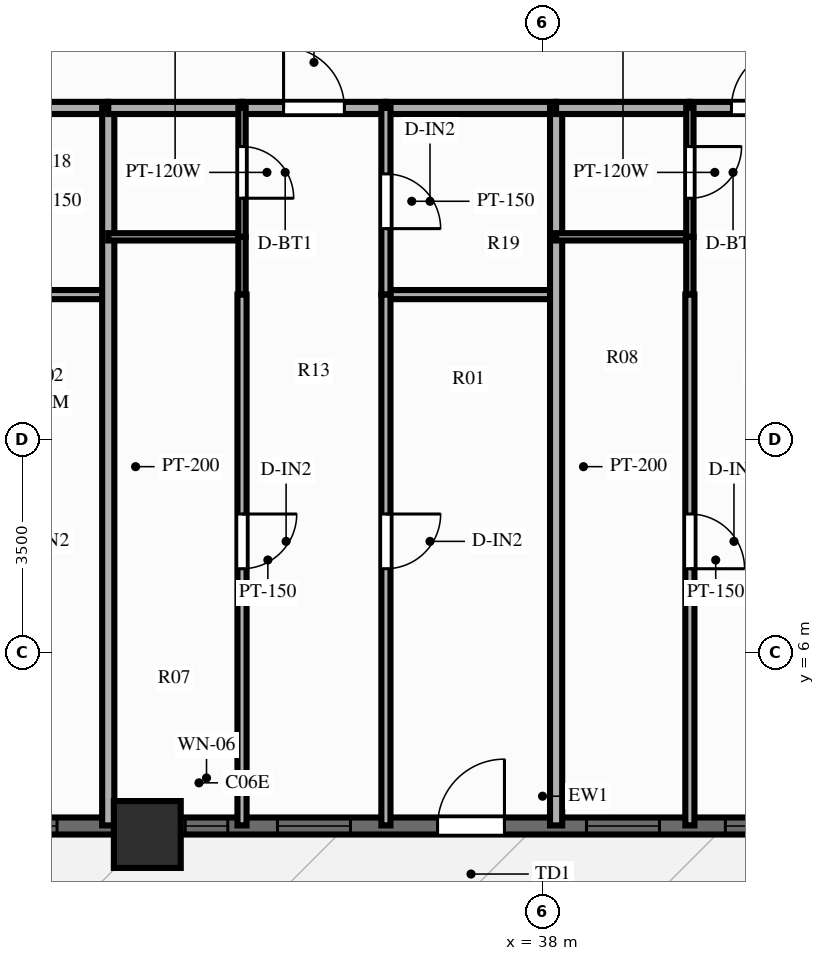
"""IFC4 building model, lengths in metres.
Left out: names, types, materials, properties, quantities, classifications, styles, units other than length and angle.
Written with IfcOpenShell. Run it as: python <this file> out.ifc"""

import sys

from ifc_helpers import new_model, si_unit, direction, frame, frame_2d, origin, origin_2d, place, context, subcontext, project, spatial, rectangle, extrude, source, transform, mapped, element, fill, save


model = new_model("IFC4")
c1 = context("Model", 3, precision=1e-05, world=origin(), true_north=direction((0.0, 1.0)))
c2 = subcontext(c1, "Body", "Model", "MODEL_VIEW")
j1 = project(units=[si_unit("LENGTHUNIT", "METRE"), si_unit("PLANEANGLEUNIT", "RADIAN")], contexts=[c1])
p1 = place(None, origin())
s1 = spatial("IfcSite", under=j1, at=p1, CompositionType="ELEMENT")
p2 = place(p1, origin())
s2 = spatial("IfcBuilding", under=s1, at=p2, CompositionType="ELEMENT")
p3 = place(p2, frame((0.0, 0.0, 19.4)))
s3 = spatial("IfcBuildingStorey", under=s2, at=p3, CompositionType="ELEMENT", Elevation=19.4)
m1 = source(origin(), c2, "Body", "SweptSolid", [
    extrude(rectangle(XDim=1.1, YDim=1.1, at=origin_2d()), origin(), (0.0, 0.0, 1.0), 3.0),
])
p4 = place(p3, frame((31.5, 3.0, 0.0), z_axis=(0.0, 0.0, 1.0), x_axis=(1.0, 0.0, 0.0)))
e1 = element("IfcColumn", 1, at=p4, inside=s3, PredefinedType="COLUMN", context=c2, shape_type="MappedRepresentation", body=[
    mapped(m1, transform((0.0, 0.0, 0.0), scale=1.0)),
])
p5 = place(p3, frame((15.5, 3.14, 0.0), z_axis=(0.0, 0.0, 1.0), x_axis=(1.0, 0.0, 0.0)))
e2 = element("IfcWall", 2, at=p5, inside=s3, PredefinedType="SOLIDWALL", context=c2, shape_type="SweptSolid", body=[
    extrude(rectangle(XDim=45.0, YDim=0.28, at=frame_2d((22.5, 0.0))), origin(), (0.0, 0.0, 1.0), 2.28),
])
p6 = place(p5, frame((0.785, 0.0, 0.25)))
e3 = element("IfcOpeningElement", 3, at=p6, cuts=e2, PredefinedType="OPENING", context=c2, shape_type="SweptSolid", body=[
    extrude(rectangle(XDim=1.2, YDim=1.5, at=frame_2d((0.6, 0.75))), frame((0.0, 0.152, 0.0), z_axis=(0.0, -1.0, 0.0), x_axis=(1.0, 0.0, 0.0)), (0.0, 0.0, 1.0), 0.304),
])
p7 = place(p5, frame((3.033, 0.0, 0.25)))
e4 = element("IfcOpeningElement", 4, at=p7, cuts=e2, PredefinedType="OPENING", context=c2, shape_type="SweptSolid", body=[
    extrude(rectangle(XDim=1.2, YDim=1.5, at=frame_2d((0.6, 0.75))), frame((0.0, 0.152, 0.0), z_axis=(0.0, -1.0, 0.0), x_axis=(1.0, 0.0, 0.0)), (0.0, 0.0, 1.0), 0.304),
])
p8 = place(p5, frame((5.727, 0.0, 0.25)))
e5 = element("IfcOpeningElement", 5, at=p8, cuts=e2, PredefinedType="OPENING", context=c2, shape_type="SweptSolid", body=[
    extrude(rectangle(XDim=1.2, YDim=1.5, at=frame_2d((0.6, 0.75))), frame((0.0, 0.152, 0.0), z_axis=(0.0, -1.0, 0.0), x_axis=(1.0, 0.0, 0.0)), (0.0, 0.0, 1.0), 0.304),
])
p9 = place(p5, frame((8.269, 0.0, 0.25)))
e6 = element("IfcOpeningElement", 6, at=p9, cuts=e2, PredefinedType="OPENING", context=c2, shape_type="SweptSolid", body=[
    extrude(rectangle(XDim=1.2, YDim=1.5, at=frame_2d((0.6, 0.75))), frame((0.0, 0.152, 0.0), z_axis=(0.0, -1.0, 0.0), x_axis=(1.0, 0.0, 0.0)), (0.0, 0.0, 1.0), 0.304),
])
p10 = place(p5, frame((10.621, 0.0, 0.25)))
e7 = element("IfcOpeningElement", 7, at=p10, cuts=e2, PredefinedType="OPENING", context=c2, shape_type="SweptSolid", body=[
    extrude(rectangle(XDim=1.2, YDim=1.5, at=frame_2d((0.6, 0.75))), frame((0.0, 0.152, 0.0), z_axis=(0.0, -1.0, 0.0), x_axis=(1.0, 0.0, 0.0)), (0.0, 0.0, 1.0), 0.304),
])
p11 = place(p5, frame((13.316, 0.0, 0.25)))
e8 = element("IfcOpeningElement", 8, at=p11, cuts=e2, PredefinedType="OPENING", context=c2, shape_type="SweptSolid", body=[
    extrude(rectangle(XDim=1.2, YDim=1.5, at=frame_2d((0.6, 0.75))), frame((0.0, 0.152, 0.0), z_axis=(0.0, -1.0, 0.0), x_axis=(1.0, 0.0, 0.0)), (0.0, 0.0, 1.0), 0.304),
])
p12 = place(p5, frame((16.624, 0.0, 0.25)))
e9 = element("IfcOpeningElement", 9, at=p12, cuts=e2, PredefinedType="OPENING", context=c2, shape_type="SweptSolid", body=[
    extrude(rectangle(XDim=0.7, YDim=1.5, at=frame_2d((0.35, 0.75))), frame((0.0, 0.152, 0.0), z_axis=(0.0, -1.0, 0.0), x_axis=(1.0, 0.0, 0.0)), (0.0, 0.0, 1.0), 0.304),
])
p13 = place(p5, frame((18.141, 0.0, 0.25)))
e10 = element("IfcOpeningElement", 10, at=p13, cuts=e2, PredefinedType="OPENING", context=c2, shape_type="SweptSolid", body=[
    extrude(rectangle(XDim=1.2, YDim=1.5, at=frame_2d((0.6, 0.75))), frame((0.0, 0.152, 0.0), z_axis=(0.0, -1.0, 0.0), x_axis=(1.0, 0.0, 0.0)), (0.0, 0.0, 1.0), 0.304),
])
p14 = place(p5, frame((21.874, 0.0, 0.0), z_axis=(0.0, 0.0, 1.0), x_axis=(-1.0, 0.0, 0.0)))
e11 = element("IfcOpeningElement", 11, at=p14, cuts=e2, PredefinedType="OPENING", context=c2, shape_type="SweptSolid", body=[
    extrude(rectangle(XDim=1.1, YDim=2.15, at=frame_2d((0.55, 1.075))), frame((0.0, 0.152, 0.0), z_axis=(0.0, -1.0, 0.0), x_axis=(1.0, 0.0, 0.0)), (0.0, 0.0, 1.0), 0.304),
])
p15 = place(p5, frame((23.223, 0.0, 0.25)))
e12 = element("IfcOpeningElement", 12, at=p15, cuts=e2, PredefinedType="OPENING", context=c2, shape_type="SweptSolid", body=[
    extrude(rectangle(XDim=1.2, YDim=1.5, at=frame_2d((0.6, 0.75))), frame((0.0, 0.152, 0.0), z_axis=(0.0, -1.0, 0.0), x_axis=(1.0, 0.0, 0.0)), (0.0, 0.0, 1.0), 0.304),
])
p16 = place(p5, frame((25.507, 0.0, 0.25)))
e13 = element("IfcOpeningElement", 13, at=p16, cuts=e2, PredefinedType="OPENING", context=c2, shape_type="SweptSolid", body=[
    extrude(rectangle(XDim=1.2, YDim=1.5, at=frame_2d((0.6, 0.75))), frame((0.0, 0.152, 0.0), z_axis=(0.0, -1.0, 0.0), x_axis=(1.0, 0.0, 0.0)), (0.0, 0.0, 1.0), 0.304),
])
p17 = place(p5, frame((27.6, 0.0, 0.25)))
e14 = element("IfcOpeningElement", 14, at=p17, cuts=e2, PredefinedType="OPENING", context=c2, shape_type="SweptSolid", body=[
    extrude(rectangle(XDim=0.7, YDim=1.5, at=frame_2d((0.35, 0.75))), frame((0.0, 0.152, 0.0), z_axis=(0.0, -1.0, 0.0), x_axis=(1.0, 0.0, 0.0)), (0.0, 0.0, 1.0), 0.304),
])
p18 = place(p5, frame((30.589, 0.0, 0.25)))
e15 = element("IfcOpeningElement", 15, at=p18, cuts=e2, PredefinedType="OPENING", context=c2, shape_type="SweptSolid", body=[
    extrude(rectangle(XDim=1.2, YDim=1.5, at=frame_2d((0.6, 0.75))), frame((0.0, 0.152, 0.0), z_axis=(0.0, -1.0, 0.0), x_axis=(1.0, 0.0, 0.0)), (0.0, 0.0, 1.0), 0.304),
])
p19 = place(p5, frame((32.872, 0.0, 0.25)))
e16 = element("IfcOpeningElement", 16, at=p19, cuts=e2, PredefinedType="OPENING", context=c2, shape_type="SweptSolid", body=[
    extrude(rectangle(XDim=1.2, YDim=1.5, at=frame_2d((0.6, 0.75))), frame((0.0, 0.152, 0.0), z_axis=(0.0, -1.0, 0.0), x_axis=(1.0, 0.0, 0.0)), (0.0, 0.0, 1.0), 0.304),
])
p20 = place(p5, frame((35.455, 0.0, 0.25)))
e17 = element("IfcOpeningElement", 17, at=p20, cuts=e2, PredefinedType="OPENING", context=c2, shape_type="SweptSolid", body=[
    extrude(rectangle(XDim=1.2, YDim=1.5, at=frame_2d((0.6, 0.75))), frame((0.0, 0.152, 0.0), z_axis=(0.0, -1.0, 0.0), x_axis=(1.0, 0.0, 0.0)), (0.0, 0.0, 1.0), 0.304),
])
p21 = place(p5, frame((37.954, 0.0, 0.25)))
e18 = element("IfcOpeningElement", 18, at=p21, cuts=e2, PredefinedType="OPENING", context=c2, shape_type="SweptSolid", body=[
    extrude(rectangle(XDim=1.2, YDim=1.5, at=frame_2d((0.6, 0.75))), frame((0.0, 0.152, 0.0), z_axis=(0.0, -1.0, 0.0), x_axis=(1.0, 0.0, 0.0)), (0.0, 0.0, 1.0), 0.304),
])
p22 = place(p5, frame((40.238, 0.0, 0.25)))
e19 = element("IfcOpeningElement", 19, at=p22, cuts=e2, PredefinedType="OPENING", context=c2, shape_type="SweptSolid", body=[
    extrude(rectangle(XDim=1.2, YDim=1.5, at=frame_2d((0.6, 0.75))), frame((0.0, 0.152, 0.0), z_axis=(0.0, -1.0, 0.0), x_axis=(1.0, 0.0, 0.0)), (0.0, 0.0, 1.0), 0.304),
])
p23 = place(p5, frame((42.716, 0.0, 0.25)))
e20 = element("IfcOpeningElement", 20, at=p23, cuts=e2, PredefinedType="OPENING", context=c2, shape_type="SweptSolid", body=[
    extrude(rectangle(XDim=1.2, YDim=1.5, at=frame_2d((0.6, 0.75))), frame((0.0, 0.152, 0.0), z_axis=(0.0, -1.0, 0.0), x_axis=(1.0, 0.0, 0.0)), (0.0, 0.0, 1.0), 0.304),
])
p24 = place(p3, frame((27.974, 14.95, 0.0), z_axis=(0.0, 0.0, 1.0), x_axis=(1.0, 0.0, 0.0)))
e21 = element("IfcWall", 21, at=p24, inside=s3, PredefinedType="PARTITIONING", context=c2, shape_type="SweptSolid", body=[
    extrude(rectangle(XDim=2.884, YDim=0.2, at=frame_2d((1.442, 0.0))), origin(), (0.0, 0.0, 1.0), 2.79),
])
p25 = place(p3, frame((27.974, 11.88, 0.0), z_axis=(0.0, 0.0, 1.0), x_axis=(1.0, 0.0, 0.0)))
e22 = element("IfcWall", 22, at=p25, inside=s3, PredefinedType="PARTITIONING", context=c2, shape_type="SweptSolid", body=[
    extrude(rectangle(XDim=2.884, YDim=0.15, at=frame_2d((1.442, 0.0))), origin(), (0.0, 0.0, 1.0), 2.79),
])
p26 = place(p3, frame((30.858, 14.95, 0.0), z_axis=(0.0, 0.0, 1.0), x_axis=(0.0, -1.0, 0.0)))
e23 = element("IfcWall", 23, at=p26, inside=s3, PredefinedType="PARTITIONING", context=c2, shape_type="SweptSolid", body=[
    extrude(rectangle(XDim=11.8, YDim=0.2, at=frame_2d((5.9, 0.0))), origin(), (0.0, 0.0, 1.0), 2.24),
])
p27 = place(p3, frame((30.858, 14.95, 0.0), z_axis=(0.0, 0.0, 1.0), x_axis=(1.0, 0.0, 0.0)))
e24 = element("IfcWall", 24, at=p27, inside=s3, PredefinedType="PARTITIONING", context=c2, shape_type="SweptSolid", body=[
    extrude(rectangle(XDim=2.2, YDim=0.2, at=frame_2d((1.1, 0.0))), origin(), (0.0, 0.0, 1.0), 2.79),
])
p28 = place(p3, frame((33.058, 14.95, 0.0), z_axis=(0.0, 0.0, 1.0), x_axis=(1.0, 0.0, 0.0)))
e25 = element("IfcWall", 25, at=p28, inside=s3, PredefinedType="PARTITIONING", context=c2, shape_type="SweptSolid", body=[
    extrude(rectangle(XDim=2.367, YDim=0.2, at=frame_2d((1.183, 0.0))), origin(), (0.0, 0.0, 1.0), 2.79),
])
p29 = place(p28, frame((0.683, 0.0, 0.0)))
e26 = element("IfcOpeningElement", 26, at=p29, cuts=e25, PredefinedType="OPENING", context=c2, shape_type="SweptSolid", body=[
    extrude(rectangle(XDim=1.0, YDim=2.15, at=frame_2d((0.5, 1.075))), frame((0.0, 0.112, 0.0), z_axis=(0.0, -1.0, 0.0), x_axis=(1.0, 0.0, 0.0)), (0.0, 0.0, 1.0), 0.224),
])
p30 = place(p3, frame((35.424, 14.95, 0.0), z_axis=(0.0, 0.0, 1.0), x_axis=(1.0, 0.0, 0.0)))
e27 = element("IfcWall", 27, at=p30, inside=s3, PredefinedType="PARTITIONING", context=c2, shape_type="SweptSolid", body=[
    extrude(rectangle(XDim=2.799, YDim=0.2, at=frame_2d((1.399, 0.0))), origin(), (0.0, 0.0, 1.0), 2.79),
])
p31 = place(p3, frame((30.858, 12.83, 0.0), z_axis=(0.0, 0.0, 1.0), x_axis=(1.0, 0.0, 0.0)))
e28 = element("IfcWall", 28, at=p31, inside=s3, PredefinedType="PARTITIONING", context=c2, shape_type="SweptSolid", body=[
    extrude(rectangle(XDim=2.2, YDim=0.12, at=frame_2d((1.1, 0.0))), origin(), (0.0, 0.0, 1.0), 2.79),
])
p32 = place(p3, frame((35.424, 11.88, 0.0), z_axis=(0.0, 0.0, 1.0), x_axis=(1.0, 0.0, 0.0)))
e29 = element("IfcWall", 29, at=p32, inside=s3, PredefinedType="PARTITIONING", context=c2, shape_type="SweptSolid", body=[
    extrude(rectangle(XDim=2.799, YDim=0.15, at=frame_2d((1.399, 0.0))), origin(), (0.0, 0.0, 1.0), 2.79),
])
p33 = place(p3, frame((33.058, 14.95, 0.0), z_axis=(0.0, 0.0, 1.0), x_axis=(0.0, -1.0, 0.0)))
e30 = element("IfcWall", 30, at=p33, inside=s3, PredefinedType="PARTITIONING", context=c2, shape_type="SweptSolid", body=[
    extrude(rectangle(XDim=2.12, YDim=0.12, at=frame_2d((1.06, 0.0))), origin(), (0.0, 0.0, 1.0), 2.79),
])
p34 = place(p33, frame((0.635, 0.0, 0.0)))
e31 = element("IfcOpeningElement", 31, at=p34, cuts=e30, PredefinedType="OPENING", context=c2, shape_type="SweptSolid", body=[
    extrude(rectangle(XDim=0.85, YDim=2.05, at=frame_2d((0.425, 1.025))), frame((0.0, 0.072, 0.0), z_axis=(0.0, -1.0, 0.0), x_axis=(1.0, 0.0, 0.0)), (0.0, 0.0, 1.0), 0.144),
])
p35 = place(p3, frame((33.058, 12.83, 0.0), z_axis=(0.0, 0.0, 1.0), x_axis=(0.0, -1.0, 0.0)))
e32 = element("IfcWall", 32, at=p35, inside=s3, PredefinedType="PARTITIONING", context=c2, shape_type="SweptSolid", body=[
    extrude(rectangle(XDim=0.95, YDim=0.12, at=frame_2d((0.475, 0.0))), origin(), (0.0, 0.0, 1.0), 2.79),
])
p36 = place(p3, frame((33.058, 11.88, 0.0), z_axis=(0.0, 0.0, 1.0), x_axis=(0.0, -1.0, 0.0)))
e33 = element("IfcWall", 33, at=p36, inside=s3, PredefinedType="PARTITIONING", context=c2, shape_type="SweptSolid", body=[
    extrude(rectangle(XDim=8.73, YDim=0.15, at=frame_2d((4.365, 0.0))), origin(), (0.0, 0.0, 1.0), 2.79),
])
p37 = place(p36, frame((3.609, 0.0, 0.0)))
e34 = element("IfcOpeningElement", 34, at=p37, cuts=e33, PredefinedType="OPENING", context=c2, shape_type="SweptSolid", body=[
    extrude(rectangle(XDim=0.9, YDim=2.1, at=frame_2d((0.45, 1.05))), frame((0.0, 0.087, 0.0), z_axis=(0.0, -1.0, 0.0), x_axis=(1.0, 0.0, 0.0)), (0.0, 0.0, 1.0), 0.174),
])
p38 = place(p3, frame((35.424, 14.95, 0.0), z_axis=(0.0, 0.0, 1.0), x_axis=(0.0, -1.0, 0.0)))
e35 = element("IfcWall", 35, at=p38, inside=s3, PredefinedType="PARTITIONING", context=c2, shape_type="SweptSolid", body=[
    extrude(rectangle(XDim=3.07, YDim=0.15, at=frame_2d((1.535, 0.0))), origin(), (0.0, 0.0, 1.0), 2.79),
])
p39 = place(p38, frame((1.085, 0.0, 0.0)))
e36 = element("IfcOpeningElement", 36, at=p39, cuts=e35, PredefinedType="OPENING", context=c2, shape_type="SweptSolid", body=[
    extrude(rectangle(XDim=0.9, YDim=2.1, at=frame_2d((0.45, 1.05))), frame((0.0, 0.087, 0.0), z_axis=(0.0, -1.0, 0.0), x_axis=(1.0, 0.0, 0.0)), (0.0, 0.0, 1.0), 0.174),
])
p40 = place(p3, frame((35.424, 11.88, 0.0), z_axis=(0.0, 0.0, 1.0), x_axis=(0.0, -1.0, 0.0)))
e37 = element("IfcWall", 37, at=p40, inside=s3, PredefinedType="PARTITIONING", context=c2, shape_type="SweptSolid", body=[
    extrude(rectangle(XDim=8.73, YDim=0.15, at=frame_2d((4.365, 0.0))), origin(), (0.0, 0.0, 1.0), 2.79),
])
p41 = place(p40, frame((3.609, 0.0, 0.0)))
e38 = element("IfcOpeningElement", 38, at=p41, cuts=e37, PredefinedType="OPENING", context=c2, shape_type="SweptSolid", body=[
    extrude(rectangle(XDim=0.9, YDim=2.1, at=frame_2d((0.45, 1.05))), frame((0.0, 0.087, 0.0), z_axis=(0.0, -1.0, 0.0), x_axis=(1.0, 0.0, 0.0)), (0.0, 0.0, 1.0), 0.174),
])
p42 = place(p3, frame((38.223, 14.95, 0.0), z_axis=(0.0, 0.0, 1.0), x_axis=(0.0, -1.0, 0.0)))
e39 = element("IfcWall", 39, at=p42, inside=s3, PredefinedType="PARTITIONING", context=c2, shape_type="SweptSolid", body=[
    extrude(rectangle(XDim=11.8, YDim=0.2, at=frame_2d((5.9, 0.0))), origin(), (0.0, 0.0, 1.0), 2.79),
])
p43 = place(p3, frame((38.223, 14.95, 0.0), z_axis=(0.0, 0.0, 1.0), x_axis=(1.0, 0.0, 0.0)))
e40 = element("IfcWall", 40, at=p43, inside=s3, PredefinedType="PARTITIONING", context=c2, shape_type="SweptSolid", body=[
    extrude(rectangle(XDim=2.2, YDim=0.2, at=frame_2d((1.1, 0.0))), origin(), (0.0, 0.0, 1.0), 2.79),
])
p44 = place(p3, frame((40.423, 14.95, 0.0), z_axis=(0.0, 0.0, 1.0), x_axis=(1.0, 0.0, 0.0)))
e41 = element("IfcWall", 41, at=p44, inside=s3, PredefinedType="PARTITIONING", context=c2, shape_type="SweptSolid", body=[
    extrude(rectangle(XDim=2.367, YDim=0.2, at=frame_2d((1.183, 0.0))), origin(), (0.0, 0.0, 1.0), 2.79),
])
p45 = place(p44, frame((0.683, 0.0, 0.0)))
e42 = element("IfcOpeningElement", 42, at=p45, cuts=e41, PredefinedType="OPENING", context=c2, shape_type="SweptSolid", body=[
    extrude(rectangle(XDim=1.0, YDim=2.15, at=frame_2d((0.5, 1.075))), frame((0.0, 0.112, 0.0), z_axis=(0.0, -1.0, 0.0), x_axis=(1.0, 0.0, 0.0)), (0.0, 0.0, 1.0), 0.224),
])
p46 = place(p3, frame((38.223, 12.83, 0.0), z_axis=(0.0, 0.0, 1.0), x_axis=(1.0, 0.0, 0.0)))
e43 = element("IfcWall", 43, at=p46, inside=s3, PredefinedType="PARTITIONING", context=c2, shape_type="SweptSolid", body=[
    extrude(rectangle(XDim=2.2, YDim=0.12, at=frame_2d((1.1, 0.0))), origin(), (0.0, 0.0, 1.0), 2.79),
])
p47 = place(p3, frame((40.423, 14.95, 0.0), z_axis=(0.0, 0.0, 1.0), x_axis=(0.0, -1.0, 0.0)))
e44 = element("IfcWall", 44, at=p47, inside=s3, PredefinedType="PARTITIONING", context=c2, shape_type="SweptSolid", body=[
    extrude(rectangle(XDim=2.12, YDim=0.12, at=frame_2d((1.06, 0.0))), origin(), (0.0, 0.0, 1.0), 2.79),
])
p48 = place(p47, frame((0.635, 0.0, 0.0)))
e45 = element("IfcOpeningElement", 45, at=p48, cuts=e44, PredefinedType="OPENING", context=c2, shape_type="SweptSolid", body=[
    extrude(rectangle(XDim=0.85, YDim=2.05, at=frame_2d((0.425, 1.025))), frame((0.0, 0.072, 0.0), z_axis=(0.0, -1.0, 0.0), x_axis=(1.0, 0.0, 0.0)), (0.0, 0.0, 1.0), 0.144),
])
p49 = place(p3, frame((40.423, 12.83, 0.0), z_axis=(0.0, 0.0, 1.0), x_axis=(0.0, -1.0, 0.0)))
e46 = element("IfcWall", 46, at=p49, inside=s3, PredefinedType="PARTITIONING", context=c2, shape_type="SweptSolid", body=[
    extrude(rectangle(XDim=0.95, YDim=0.12, at=frame_2d((0.475, 0.0))), origin(), (0.0, 0.0, 1.0), 2.79),
])
p50 = place(p3, frame((40.423, 11.88, 0.0), z_axis=(0.0, 0.0, 1.0), x_axis=(0.0, -1.0, 0.0)))
e47 = element("IfcWall", 47, at=p50, inside=s3, PredefinedType="PARTITIONING", context=c2, shape_type="SweptSolid", body=[
    extrude(rectangle(XDim=8.73, YDim=0.15, at=frame_2d((4.365, 0.0))), origin(), (0.0, 0.0, 1.0), 2.79),
])
p51 = place(p50, frame((3.609, 0.0, 0.0)))
e48 = element("IfcOpeningElement", 48, at=p51, cuts=e47, PredefinedType="OPENING", context=c2, shape_type="SweptSolid", body=[
    extrude(rectangle(XDim=0.9, YDim=2.1, at=frame_2d((0.45, 1.05))), frame((0.0, 0.087, 0.0), z_axis=(0.0, -1.0, 0.0), x_axis=(1.0, 0.0, 0.0)), (0.0, 0.0, 1.0), 0.174),
])
m2 = source(origin(), c2, "Body", "SweptSolid", [
    extrude(rectangle(XDim=1.2, YDim=1.5, at=frame_2d((0.6, 0.75))), frame((0.0, 0.03, 0.0), z_axis=(0.0, -1.0, 0.0), x_axis=(1.0, 0.0, 0.0)), (0.0, 0.0, 1.0), 0.06),
])
p52 = place(p11, origin())
e49 = element("IfcWindow", 49, at=p52, inside=s3, PartitioningType="SINGLE_PANEL", PredefinedType="WINDOW", context=c2, shape_type="MappedRepresentation", body=[
    mapped(m2, transform((0.0, 0.0, 0.0), scale=1.0)),
])
fill(e8, e49)
m3 = source(origin(), c2, "Body", "SweptSolid", [
    extrude(rectangle(XDim=0.7, YDim=1.5, at=frame_2d((0.35, 0.75))), frame((0.0, 0.03, 0.0), z_axis=(0.0, -1.0, 0.0), x_axis=(1.0, 0.0, 0.0)), (0.0, 0.0, 1.0), 0.06),
])
p53 = place(p12, origin())
e50 = element("IfcWindow", 50, at=p53, inside=s3, PartitioningType="SINGLE_PANEL", PredefinedType="WINDOW", context=c2, shape_type="MappedRepresentation", body=[
    mapped(m3, transform((0.0, 0.0, 0.0), scale=1.0)),
])
fill(e9, e50)
p54 = place(p13, origin())
e51 = element("IfcWindow", 51, at=p54, inside=s3, PartitioningType="SINGLE_PANEL", PredefinedType="WINDOW", context=c2, shape_type="MappedRepresentation", body=[
    mapped(m2, transform((0.0, 0.0, 0.0), scale=1.0)),
])
fill(e10, e51)
m4 = source(origin(), c2, "Body", "SweptSolid", [
    extrude(rectangle(XDim=1.1, YDim=2.15, at=frame_2d((0.55, 1.075))), frame((0.0, 0.025, 0.0), z_axis=(0.0, -1.0, 0.0), x_axis=(1.0, 0.0, 0.0)), (0.0, 0.0, 1.0), 0.05),
])
p55 = place(p14, origin())
e52 = element("IfcDoor", 52, at=p55, inside=s3, OperationType="SINGLE_SWING_LEFT", PredefinedType="DOOR", context=c2, shape_type="MappedRepresentation", body=[
    mapped(m4, transform((0.0, 0.0, 0.0), scale=1.0)),
])
fill(e11, e52)
p56 = place(p15, origin())
e53 = element("IfcWindow", 53, at=p56, inside=s3, PartitioningType="SINGLE_PANEL", PredefinedType="WINDOW", context=c2, shape_type="MappedRepresentation", body=[
    mapped(m2, transform((0.0, 0.0, 0.0), scale=1.0)),
])
fill(e12, e53)
p57 = place(p16, origin())
e54 = element("IfcWindow", 54, at=p57, inside=s3, PartitioningType="SINGLE_PANEL", PredefinedType="WINDOW", context=c2, shape_type="MappedRepresentation", body=[
    mapped(m2, transform((0.0, 0.0, 0.0), scale=1.0)),
])
fill(e13, e54)
m5 = source(origin(), c2, "Body", "SweptSolid", [
    extrude(rectangle(XDim=1.0, YDim=2.15, at=frame_2d((0.5, 1.075))), frame((0.0, 0.025, 0.0), z_axis=(0.0, -1.0, 0.0), x_axis=(1.0, 0.0, 0.0)), (0.0, 0.0, 1.0), 0.05),
])
p58 = place(p29, origin())
e55 = element("IfcDoor", 55, at=p58, inside=s3, OperationType="SINGLE_SWING_LEFT", PredefinedType="DOOR", context=c2, shape_type="MappedRepresentation", body=[
    mapped(m5, transform((0.0, 0.0, 0.0), scale=1.0)),
])
fill(e26, e55)
m6 = source(origin(), c2, "Body", "SweptSolid", [
    extrude(rectangle(XDim=0.85, YDim=2.05, at=frame_2d((0.425, 1.025))), frame((0.0, 0.025, 0.0), z_axis=(0.0, -1.0, 0.0), x_axis=(1.0, 0.0, 0.0)), (0.0, 0.0, 1.0), 0.05),
])
p59 = place(p34, origin())
e56 = element("IfcDoor", 56, at=p59, inside=s3, OperationType="SINGLE_SWING_RIGHT", PredefinedType="DOOR", context=c2, shape_type="MappedRepresentation", body=[
    mapped(m6, transform((0.0, 0.0, 0.0), scale=1.0)),
])
fill(e31, e56)
m7 = source(origin(), c2, "Body", "SweptSolid", [
    extrude(rectangle(XDim=0.9, YDim=2.1, at=frame_2d((0.45, 1.05))), frame((0.0, 0.025, 0.0), z_axis=(0.0, -1.0, 0.0), x_axis=(1.0, 0.0, 0.0)), (0.0, 0.0, 1.0), 0.05),
])
p60 = place(p37, origin())
e57 = element("IfcDoor", 57, at=p60, inside=s3, OperationType="SINGLE_SWING_LEFT", PredefinedType="DOOR", context=c2, shape_type="MappedRepresentation", body=[
    mapped(m7, transform((0.0, 0.0, 0.0), scale=1.0)),
])
fill(e34, e57)
p61 = place(p39, origin())
e58 = element("IfcDoor", 58, at=p61, inside=s3, OperationType="SINGLE_SWING_RIGHT", PredefinedType="DOOR", context=c2, shape_type="MappedRepresentation", body=[
    mapped(m7, transform((0.0, 0.0, 0.0), scale=1.0)),
])
fill(e36, e58)
p62 = place(p41, origin())
e59 = element("IfcDoor", 59, at=p62, inside=s3, OperationType="SINGLE_SWING_LEFT", PredefinedType="DOOR", context=c2, shape_type="MappedRepresentation", body=[
    mapped(m7, transform((0.0, 0.0, 0.0), scale=1.0)),
])
fill(e38, e59)
p63 = place(p45, origin())
e60 = element("IfcDoor", 60, at=p63, inside=s3, OperationType="SINGLE_SWING_RIGHT", PredefinedType="DOOR", context=c2, shape_type="MappedRepresentation", body=[
    mapped(m5, transform((0.0, 0.0, 0.0), scale=1.0)),
])
fill(e42, e60)
p64 = place(p48, origin())
e61 = element("IfcDoor", 61, at=p64, inside=s3, OperationType="SINGLE_SWING_LEFT", PredefinedType="DOOR", context=c2, shape_type="MappedRepresentation", body=[
    mapped(m6, transform((0.0, 0.0, 0.0), scale=1.0)),
])
fill(e45, e61)
p65 = place(p51, origin())
e62 = element("IfcDoor", 62, at=p65, inside=s3, OperationType="SINGLE_SWING_RIGHT", PredefinedType="DOOR", context=c2, shape_type="MappedRepresentation", body=[
    mapped(m7, transform((0.0, 0.0, 0.0), scale=1.0)),
])
fill(e48, e62)
save(model, sys.argv[1])
